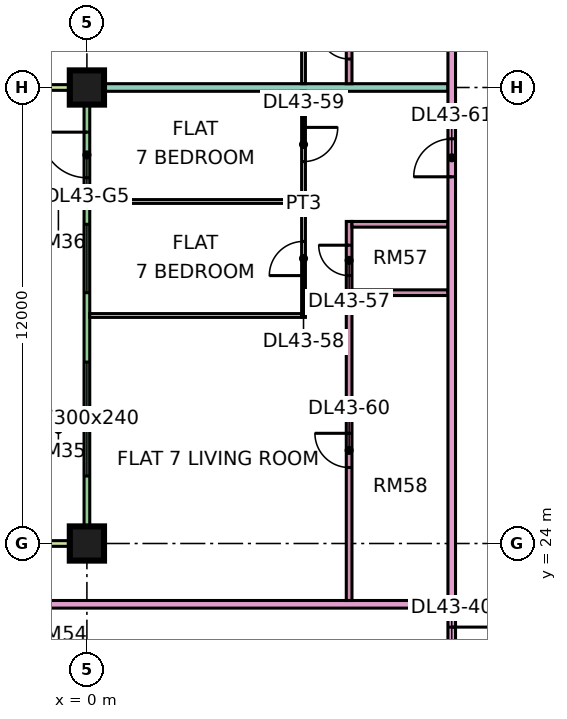
"""IFC4 building model, lengths in metres.
Left out: names, types, materials, properties, quantities, classifications, styles, units other than length and angle.
Written with IfcOpenShell. Run it as: python <this file> out.ifc"""

import sys

from ifc_helpers import new_model, si_unit, direction, frame, frame_2d, origin, origin_2d, place, context, subcontext, project, spatial, rectangle, extrude, element, fill, save


model = new_model("IFC4")
c1 = context("Model", 3, precision=1e-05, world=origin(), true_north=direction((0.0, 1.0)))
c2 = subcontext(c1, "Body", "Model", "MODEL_VIEW")
j1 = project(units=[si_unit("LENGTHUNIT", "METRE"), si_unit("PLANEANGLEUNIT", "RADIAN")], contexts=[c1])
p1 = place(None, origin())
s1 = spatial("IfcSite", under=j1, at=p1, CompositionType="ELEMENT")
p2 = place(p1, origin())
s2 = spatial("IfcBuilding", under=s1, at=p2, CompositionType="ELEMENT")
p3 = place(p2, frame((0.0, 0.0, 187.4)))
s3 = spatial("IfcBuildingStorey", under=s2, at=p3, CompositionType="ELEMENT", Elevation=187.4)
p4 = place(p3, frame((0.0, 24.0, 0.0), z_axis=(0.0, 0.0, 1.0), x_axis=(1.0, 0.0, 0.0)))
e1 = element("IfcColumn", 1, at=p4, inside=s3, PredefinedType="COLUMN", context=c2, shape_type="SweptSolid", body=[
    extrude(rectangle(XDim=0.9, YDim=0.9, at=origin_2d()), origin(), (0.0, 0.0, 1.0), 3.75),
])
p5 = place(p3, frame((0.0, 36.0, 0.0), z_axis=(0.0, 0.0, 1.0), x_axis=(1.0, 0.0, 0.0)))
e2 = element("IfcColumn", 2, at=p5, inside=s3, PredefinedType="COLUMN", context=c2, shape_type="SweptSolid", body=[
    extrude(rectangle(XDim=0.9, YDim=0.9, at=origin_2d()), origin(), (0.0, 0.0, 1.0), 3.75),
])
p6 = place(p3, frame((0.0, 35.925, 0.0), z_axis=(0.0, 0.0, 1.0), x_axis=(0.0, -1.0, 0.0)))
e3 = element("IfcWall", 3, at=p6, inside=s3, PredefinedType="SOLIDWALL", context=c2, shape_type="SweptSolid", body=[
    extrude(rectangle(XDim=11.85, YDim=0.15, at=frame_2d((5.925, 0.0))), origin(), (0.0, 0.0, 1.0), 3.35),
])
p7 = place(p6, frame((1.1, 0.0, 0.0)))
e4 = element("IfcOpeningElement", 4, at=p7, cuts=e3, PredefinedType="OPENING", context=c2, shape_type="SweptSolid", body=[
    extrude(rectangle(XDim=1.2, YDim=2.4, at=frame_2d((0.6, 1.2))), frame((0.0, 0.085, 0.0), z_axis=(0.0, -1.0, 0.0), x_axis=(1.0, 0.0, 0.0)), (0.0, 0.0, 1.0), 0.17),
])
p8 = place(p6, frame((3.525, 0.0, 0.45)))
e5 = element("IfcOpeningElement", 5, at=p8, cuts=e3, PredefinedType="OPENING", context=c2, shape_type="SweptSolid", body=[
    extrude(rectangle(XDim=1.8, YDim=2.4, at=frame_2d((0.9, 1.2))), frame((0.0, 0.085, 0.0), z_axis=(0.0, -1.0, 0.0), x_axis=(1.0, 0.0, 0.0)), (0.0, 0.0, 1.0), 0.17),
])
p9 = place(p6, frame((7.15, 0.0, 0.45)))
e6 = element("IfcOpeningElement", 6, at=p9, cuts=e3, PredefinedType="OPENING", context=c2, shape_type="SweptSolid", body=[
    extrude(rectangle(XDim=3.0, YDim=2.4, at=frame_2d((1.5, 1.2))), frame((0.0, 0.085, 0.0), z_axis=(0.0, -1.0, 0.0), x_axis=(1.0, 0.0, 0.0)), (0.0, 0.0, 1.0), 0.17),
])
for number, where, z_axis, x_axis in (
    (7, (-1.5, 36.0, 0.0), (0.0, 0.0, 1.0), (1.0, 0.0, 0.0)),
    (8, (-1.5, 24.0, 0.0), (0.0, 0.0, 1.0), (1.0, 0.0, 0.0)),
):
    element("IfcWall", number, at=place(p3, frame(where, z_axis=z_axis, x_axis=x_axis)), inside=s3, PredefinedType="SOLIDWALL", context=c2, shape_type="SweptSolid", body=[
        extrude(rectangle(XDim=1.5, YDim=0.15, at=frame_2d((0.75, 0.0))), origin(), (0.0, 0.0, 1.0), 3.35),
    ])
p10 = place(p3, frame((-1.35, 22.4, 0.0), z_axis=(0.0, 0.0, 1.0), x_axis=(1.0, 0.0, 0.0)))
e9 = element("IfcWall", 9, at=p10, inside=s3, PredefinedType="PARTITIONING", context=c2, shape_type="SweptSolid", body=[
    extrude(rectangle(XDim=10.85, YDim=0.2, at=frame_2d((5.425, 0.0))), origin(), (0.0, 0.0, 1.0), 3.35),
])
e10 = element("IfcWall", 10, at=p5, inside=s3, PredefinedType="PARTITIONING", context=c2, shape_type="SweptSolid", body=[
    extrude(rectangle(XDim=9.5, YDim=0.2, at=frame_2d((4.75, 0.0))), origin(), (0.0, 0.0, 1.0), 3.35),
])
for number, where, z_axis, x_axis in (
    (11, (0.074, 30.0, 0.0), (0.0, 0.0, 1.0), (1.0, 0.0, 0.0)),
    (12, (0.074, 33.0, 0.0), (0.0, 0.0, 1.0), (1.0, 0.0, 0.0)),
):
    element("IfcWall", number, at=place(p3, frame(where, z_axis=z_axis, x_axis=x_axis)), inside=s3, PredefinedType="PARTITIONING", context=c2, shape_type="SweptSolid", body=[
        extrude(rectangle(XDim=5.576, YDim=0.1, at=frame_2d((2.788, 0.0))), origin(), (0.0, 0.0, 1.0), 3.35),
    ])
p11 = place(p3, frame((5.7, 29.95, 0.0), z_axis=(0.0, 0.0, 1.0), x_axis=(0.0, 1.0, 0.0)))
e13 = element("IfcWall", 13, at=p11, inside=s3, PredefinedType="PARTITIONING", context=c2, shape_type="SweptSolid", body=[
    extrude(rectangle(XDim=5.95, YDim=0.1, at=frame_2d((2.975, 0.0))), origin(), (0.0, 0.0, 1.0), 3.35),
])
p12 = place(p11, frame((1.1, 0.0, 0.0)))
e14 = element("IfcOpeningElement", 14, at=p12, cuts=e13, PredefinedType="OPENING", context=c2, shape_type="SweptSolid", body=[
    extrude(rectangle(XDim=0.9, YDim=2.1, at=frame_2d((0.45, 1.05))), frame((0.0, 0.06, 0.0), z_axis=(0.0, -1.0, 0.0), x_axis=(1.0, 0.0, 0.0)), (0.0, 0.0, 1.0), 0.12),
])
p13 = place(p11, frame((4.1, 0.0, 0.0)))
e15 = element("IfcOpeningElement", 15, at=p13, cuts=e13, PredefinedType="OPENING", context=c2, shape_type="SweptSolid", body=[
    extrude(rectangle(XDim=0.9, YDim=2.1, at=frame_2d((0.45, 1.05))), frame((0.0, 0.06, 0.0), z_axis=(0.0, -1.0, 0.0), x_axis=(1.0, 0.0, 0.0)), (0.0, 0.0, 1.0), 0.12),
])
p14 = place(p3, frame((5.7, 36.1, 0.0), z_axis=(0.0, 0.0, 1.0), x_axis=(0.0, 1.0, 0.0)))
e16 = element("IfcWall", 16, at=p14, inside=s3, PredefinedType="PARTITIONING", context=c2, shape_type="SweptSolid", body=[
    extrude(rectangle(XDim=26.826, YDim=0.1, at=frame_2d((13.413, 0.0))), origin(), (0.0, 0.0, 1.0), 3.35),
])
p15 = place(p14, frame((9.95, 0.0, 0.0)))
e17 = element("IfcOpeningElement", 17, at=p15, cuts=e16, PredefinedType="OPENING", context=c2, shape_type="SweptSolid", body=[
    extrude(rectangle(XDim=0.9, YDim=2.1, at=frame_2d((0.45, 1.05))), frame((0.0, 0.06, 0.0), z_axis=(0.0, -1.0, 0.0), x_axis=(1.0, 0.0, 0.0)), (0.0, 0.0, 1.0), 0.12),
])
p16 = place(p14, frame((12.95, 0.0, 0.0)))
e18 = element("IfcOpeningElement", 18, at=p16, cuts=e16, PredefinedType="OPENING", context=c2, shape_type="SweptSolid", body=[
    extrude(rectangle(XDim=0.9, YDim=2.1, at=frame_2d((0.45, 1.05))), frame((0.0, 0.06, 0.0), z_axis=(0.0, -1.0, 0.0), x_axis=(1.0, 0.0, 0.0)), (0.0, 0.0, 1.0), 0.12),
])
p17 = place(p14, frame((15.95, 0.0, 0.0)))
e19 = element("IfcOpeningElement", 19, at=p17, cuts=e16, PredefinedType="OPENING", context=c2, shape_type="SweptSolid", body=[
    extrude(rectangle(XDim=0.9, YDim=2.1, at=frame_2d((0.45, 1.05))), frame((0.0, 0.06, 0.0), z_axis=(0.0, -1.0, 0.0), x_axis=(1.0, 0.0, 0.0)), (0.0, 0.0, 1.0), 0.12),
])
p18 = place(p14, frame((18.95, 0.0, 0.0)))
e20 = element("IfcOpeningElement", 20, at=p18, cuts=e16, PredefinedType="OPENING", context=c2, shape_type="SweptSolid", body=[
    extrude(rectangle(XDim=0.9, YDim=2.1, at=frame_2d((0.45, 1.05))), frame((0.0, 0.06, 0.0), z_axis=(0.0, -1.0, 0.0), x_axis=(1.0, 0.0, 0.0)), (0.0, 0.0, 1.0), 0.12),
])
p19 = place(p14, frame((24.95, 0.0, 0.0)))
e21 = element("IfcOpeningElement", 21, at=p19, cuts=e16, PredefinedType="OPENING", context=c2, shape_type="SweptSolid", body=[
    extrude(rectangle(XDim=0.9, YDim=2.1, at=frame_2d((0.45, 1.05))), frame((0.0, 0.06, 0.0), z_axis=(0.0, -1.0, 0.0), x_axis=(1.0, 0.0, 0.0)), (0.0, 0.0, 1.0), 0.12),
])
p20 = place(p14, frame((3.95, 0.0, 0.0)))
e22 = element("IfcOpeningElement", 22, at=p20, cuts=e16, PredefinedType="OPENING", context=c2, shape_type="SweptSolid", body=[
    extrude(rectangle(XDim=0.9, YDim=2.1, at=frame_2d((0.45, 1.05))), frame((0.0, 0.06, 0.0), z_axis=(0.0, -1.0, 0.0), x_axis=(1.0, 0.0, 0.0)), (0.0, 0.0, 1.0), 0.12),
])
p21 = place(p14, frame((21.95, 0.0, 0.0)))
e23 = element("IfcOpeningElement", 23, at=p21, cuts=e16, PredefinedType="OPENING", context=c2, shape_type="SweptSolid", body=[
    extrude(rectangle(XDim=0.9, YDim=2.1, at=frame_2d((0.45, 1.05))), frame((0.0, 0.06, 0.0), z_axis=(0.0, -1.0, 0.0), x_axis=(1.0, 0.0, 0.0)), (0.0, 0.0, 1.0), 0.12),
])
p22 = place(p3, frame((6.9, 22.5, 0.0), z_axis=(0.0, 0.0, 1.0), x_axis=(0.0, 1.0, 0.0)))
e24 = element("IfcWall", 24, at=p22, inside=s3, PredefinedType="PARTITIONING", context=c2, shape_type="SweptSolid", body=[
    extrude(rectangle(XDim=9.975, YDim=0.15, at=frame_2d((4.988, 0.0))), origin(), (0.0, 0.0, 1.0), 3.35),
])
p23 = place(p22, frame((8.55, 0.0, 0.0)))
e25 = element("IfcOpeningElement", 25, at=p23, cuts=e24, PredefinedType="OPENING", context=c2, shape_type="SweptSolid", body=[
    extrude(rectangle(XDim=0.8, YDim=2.1, at=frame_2d((0.4, 1.05))), frame((0.0, 0.085, 0.0), z_axis=(0.0, -1.0, 0.0), x_axis=(1.0, 0.0, 0.0)), (0.0, 0.0, 1.0), 0.17),
])
p24 = place(p22, frame((3.5, 0.0, 0.0)))
e26 = element("IfcOpeningElement", 26, at=p24, cuts=e24, PredefinedType="OPENING", context=c2, shape_type="SweptSolid", body=[
    extrude(rectangle(XDim=0.9, YDim=2.1, at=frame_2d((0.45, 1.05))), frame((0.0, 0.085, 0.0), z_axis=(0.0, -1.0, 0.0), x_axis=(1.0, 0.0, 0.0)), (0.0, 0.0, 1.0), 0.17),
])
p25 = place(p3, frame((6.9, 36.1, 0.0), z_axis=(0.0, 0.0, 1.0), x_axis=(0.0, 1.0, 0.0)))
e27 = element("IfcWall", 27, at=p25, inside=s3, PredefinedType="PARTITIONING", context=c2, shape_type="SweptSolid", body=[
    extrude(rectangle(XDim=14.675, YDim=0.15, at=frame_2d((7.337, 0.0))), origin(), (0.0, 0.0, 1.0), 3.35),
])
p26 = place(p25, frame((7.55, 0.0, 0.0)))
e28 = element("IfcOpeningElement", 28, at=p26, cuts=e27, PredefinedType="OPENING", context=c2, shape_type="SweptSolid", body=[
    extrude(rectangle(XDim=0.8, YDim=2.1, at=frame_2d((0.4, 1.05))), frame((0.0, 0.085, 0.0), z_axis=(0.0, -1.0, 0.0), x_axis=(1.0, 0.0, 0.0)), (0.0, 0.0, 1.0), 0.17),
])
p27 = place(p25, frame((0.65, 0.0, 0.0)))
e29 = element("IfcOpeningElement", 29, at=p27, cuts=e27, PredefinedType="OPENING", context=c2, shape_type="SweptSolid", body=[
    extrude(rectangle(XDim=0.8, YDim=2.1, at=frame_2d((0.4, 1.05))), frame((0.0, 0.085, 0.0), z_axis=(0.0, -1.0, 0.0), x_axis=(1.0, 0.0, 0.0)), (0.0, 0.0, 1.0), 0.17),
])
p28 = place(p25, frame((10.25, 0.0, 0.0)))
e30 = element("IfcOpeningElement", 30, at=p28, cuts=e27, PredefinedType="OPENING", context=c2, shape_type="SweptSolid", body=[
    extrude(rectangle(XDim=0.8, YDim=2.1, at=frame_2d((0.4, 1.05))), frame((0.0, 0.085, 0.0), z_axis=(0.0, -1.0, 0.0), x_axis=(1.0, 0.0, 0.0)), (0.0, 0.0, 1.0), 0.17),
])
p29 = place(p25, frame((3.95, 0.0, 0.0)))
e31 = element("IfcOpeningElement", 31, at=p29, cuts=e27, PredefinedType="OPENING", context=c2, shape_type="SweptSolid", body=[
    extrude(rectangle(XDim=0.9, YDim=2.1, at=frame_2d((0.45, 1.05))), frame((0.0, 0.085, 0.0), z_axis=(0.0, -1.0, 0.0), x_axis=(1.0, 0.0, 0.0)), (0.0, 0.0, 1.0), 0.17),
])
for number, where, z_axis, x_axis in (
    (32, (6.975, 30.6, 0.0), (0.0, 0.0, 1.0), (1.0, 0.0, 0.0)),
    (33, (6.975, 32.4, 0.0), (0.0, 0.0, 1.0), (1.0, 0.0, 0.0)),
):
    element("IfcWall", number, at=place(p3, frame(where, z_axis=z_axis, x_axis=x_axis)), inside=s3, PredefinedType="PARTITIONING", context=c2, shape_type="SweptSolid", body=[
        extrude(rectangle(XDim=2.525, YDim=0.15, at=frame_2d((1.262, 0.0))), origin(), (0.0, 0.0, 1.0), 3.35),
    ])
p30 = place(p3, frame((9.6, 20.0, 0.0), z_axis=(0.0, 0.0, 1.0), x_axis=(0.0, 1.0, 0.0)))
e34 = element("IfcWall", 34, at=p30, inside=s3, PredefinedType="PARTITIONING", context=c2, shape_type="SweptSolid", body=[
    extrude(rectangle(XDim=42.926, YDim=0.2, at=frame_2d((21.463, 0.0))), origin(), (0.0, 0.0, 1.0), 3.35),
])
p31 = place(p30, frame((31.65, 0.0, 0.0)))
e35 = element("IfcOpeningElement", 35, at=p31, cuts=e34, PredefinedType="OPENING", context=c2, shape_type="SweptSolid", body=[
    extrude(rectangle(XDim=1.0, YDim=2.1, at=frame_2d((0.5, 1.05))), frame((0.0, 0.11, 0.0), z_axis=(0.0, -1.0, 0.0), x_axis=(1.0, 0.0, 0.0)), (0.0, 0.0, 1.0), 0.22),
])
p32 = place(p30, frame((0.6, 0.0, 0.0)))
e36 = element("IfcOpeningElement", 36, at=p32, cuts=e34, PredefinedType="OPENING", context=c2, shape_type="SweptSolid", body=[
    extrude(rectangle(XDim=1.2, YDim=2.1, at=frame_2d((0.6, 1.05))), frame((0.0, 0.11, 0.0), z_axis=(0.0, -1.0, 0.0), x_axis=(1.0, 0.0, 0.0)), (0.0, 0.0, 1.0), 0.22),
])
p33 = place(p30, frame((13.65, 0.0, 0.0)))
e37 = element("IfcOpeningElement", 37, at=p33, cuts=e34, PredefinedType="OPENING", context=c2, shape_type="SweptSolid", body=[
    extrude(rectangle(XDim=1.0, YDim=2.1, at=frame_2d((0.5, 1.05))), frame((0.0, 0.11, 0.0), z_axis=(0.0, -1.0, 0.0), x_axis=(1.0, 0.0, 0.0)), (0.0, 0.0, 1.0), 0.22),
])
p34 = place(p7, frame((1.2, 0.0, 0.0), z_axis=(0.0, 0.0, 1.0), x_axis=(-1.0, 0.0, 0.0)))
e38 = element("IfcDoor", 38, at=p34, inside=s3, OperationType="DOUBLE_DOOR_SINGLE_SWING", PredefinedType="DOOR", context=c2, shape_type="SweptSolid", body=[
    extrude(rectangle(XDim=1.2, YDim=2.4, at=frame_2d((0.6, 1.2))), frame((0.0, 0.025, 0.0), z_axis=(0.0, -1.0, 0.0), x_axis=(1.0, 0.0, 0.0)), (0.0, 0.0, 1.0), 0.05),
])
fill(e4, e38)
p35 = place(p8, origin())
e39 = element("IfcWindow", 39, at=p35, inside=s3, PartitioningType="SINGLE_PANEL", PredefinedType="WINDOW", context=c2, shape_type="SweptSolid", body=[
    extrude(rectangle(XDim=1.8, YDim=2.4, at=frame_2d((0.9, 1.2))), frame((0.0, 0.03, 0.0), z_axis=(0.0, -1.0, 0.0), x_axis=(1.0, 0.0, 0.0)), (0.0, 0.0, 1.0), 0.06),
])
fill(e5, e39)
p36 = place(p9, origin())
e40 = element("IfcWindow", 40, at=p36, inside=s3, PartitioningType="SINGLE_PANEL", PredefinedType="WINDOW", context=c2, shape_type="SweptSolid", body=[
    extrude(rectangle(XDim=3.0, YDim=2.4, at=frame_2d((1.5, 1.2))), frame((0.0, 0.03, 0.0), z_axis=(0.0, -1.0, 0.0), x_axis=(1.0, 0.0, 0.0)), (0.0, 0.0, 1.0), 0.06),
])
fill(e6, e40)
p37 = place(p27, frame((0.8, 0.0, 0.0), z_axis=(0.0, 0.0, 1.0), x_axis=(-1.0, 0.0, 0.0)))
e41 = element("IfcDoor", 41, at=p37, inside=s3, OperationType="SINGLE_SWING_RIGHT", PredefinedType="DOOR", context=c2, shape_type="SweptSolid", body=[
    extrude(rectangle(XDim=0.8, YDim=2.1, at=frame_2d((0.4, 1.05))), frame((0.0, 0.025, 0.0), z_axis=(0.0, -1.0, 0.0), x_axis=(1.0, 0.0, 0.0)), (0.0, 0.0, 1.0), 0.05),
])
fill(e29, e41)
p38 = place(p32, origin())
e42 = element("IfcDoor", 42, at=p38, inside=s3, OperationType="SINGLE_SWING_RIGHT", PredefinedType="DOOR", context=c2, shape_type="SweptSolid", body=[
    extrude(rectangle(XDim=1.2, YDim=2.1, at=frame_2d((0.6, 1.05))), frame((0.0, 0.025, 0.0), z_axis=(0.0, -1.0, 0.0), x_axis=(1.0, 0.0, 0.0)), (0.0, 0.0, 1.0), 0.05),
])
fill(e36, e42)
p39 = place(p23, frame((0.8, 0.0, 0.0), z_axis=(0.0, 0.0, 1.0), x_axis=(-1.0, 0.0, 0.0)))
e43 = element("IfcDoor", 43, at=p39, inside=s3, OperationType="SINGLE_SWING_RIGHT", PredefinedType="DOOR", context=c2, shape_type="SweptSolid", body=[
    extrude(rectangle(XDim=0.8, YDim=2.1, at=frame_2d((0.4, 1.05))), frame((0.0, 0.025, 0.0), z_axis=(0.0, -1.0, 0.0), x_axis=(1.0, 0.0, 0.0)), (0.0, 0.0, 1.0), 0.05),
])
fill(e25, e43)
p40 = place(p12, origin())
e44 = element("IfcDoor", 44, at=p40, inside=s3, OperationType="SINGLE_SWING_LEFT", PredefinedType="DOOR", context=c2, shape_type="SweptSolid", body=[
    extrude(rectangle(XDim=0.9, YDim=2.1, at=frame_2d((0.45, 1.05))), frame((0.0, 0.025, 0.0), z_axis=(0.0, -1.0, 0.0), x_axis=(1.0, 0.0, 0.0)), (0.0, 0.0, 1.0), 0.05),
])
fill(e14, e44)
p41 = place(p13, origin())
e45 = element("IfcDoor", 45, at=p41, inside=s3, OperationType="SINGLE_SWING_RIGHT", PredefinedType="DOOR", context=c2, shape_type="SweptSolid", body=[
    extrude(rectangle(XDim=0.9, YDim=2.1, at=frame_2d((0.45, 1.05))), frame((0.0, 0.025, 0.0), z_axis=(0.0, -1.0, 0.0), x_axis=(1.0, 0.0, 0.0)), (0.0, 0.0, 1.0), 0.05),
])
fill(e15, e45)
p42 = place(p24, frame((0.9, 0.0, 0.0), z_axis=(0.0, 0.0, 1.0), x_axis=(-1.0, 0.0, 0.0)))
e46 = element("IfcDoor", 46, at=p42, inside=s3, OperationType="SINGLE_SWING_RIGHT", PredefinedType="DOOR", context=c2, shape_type="SweptSolid", body=[
    extrude(rectangle(XDim=0.9, YDim=2.1, at=frame_2d((0.45, 1.05))), frame((0.0, 0.025, 0.0), z_axis=(0.0, -1.0, 0.0), x_axis=(1.0, 0.0, 0.0)), (0.0, 0.0, 1.0), 0.05),
])
fill(e26, e46)
p43 = place(p33, origin())
e47 = element("IfcDoor", 47, at=p43, inside=s3, OperationType="SINGLE_SWING_LEFT", PredefinedType="DOOR", context=c2, shape_type="SweptSolid", body=[
    extrude(rectangle(XDim=1.0, YDim=2.1, at=frame_2d((0.5, 1.05))), frame((0.0, 0.025, 0.0), z_axis=(0.0, -1.0, 0.0), x_axis=(1.0, 0.0, 0.0)), (0.0, 0.0, 1.0), 0.05),
])
fill(e37, e47)
save(model, sys.argv[1])
